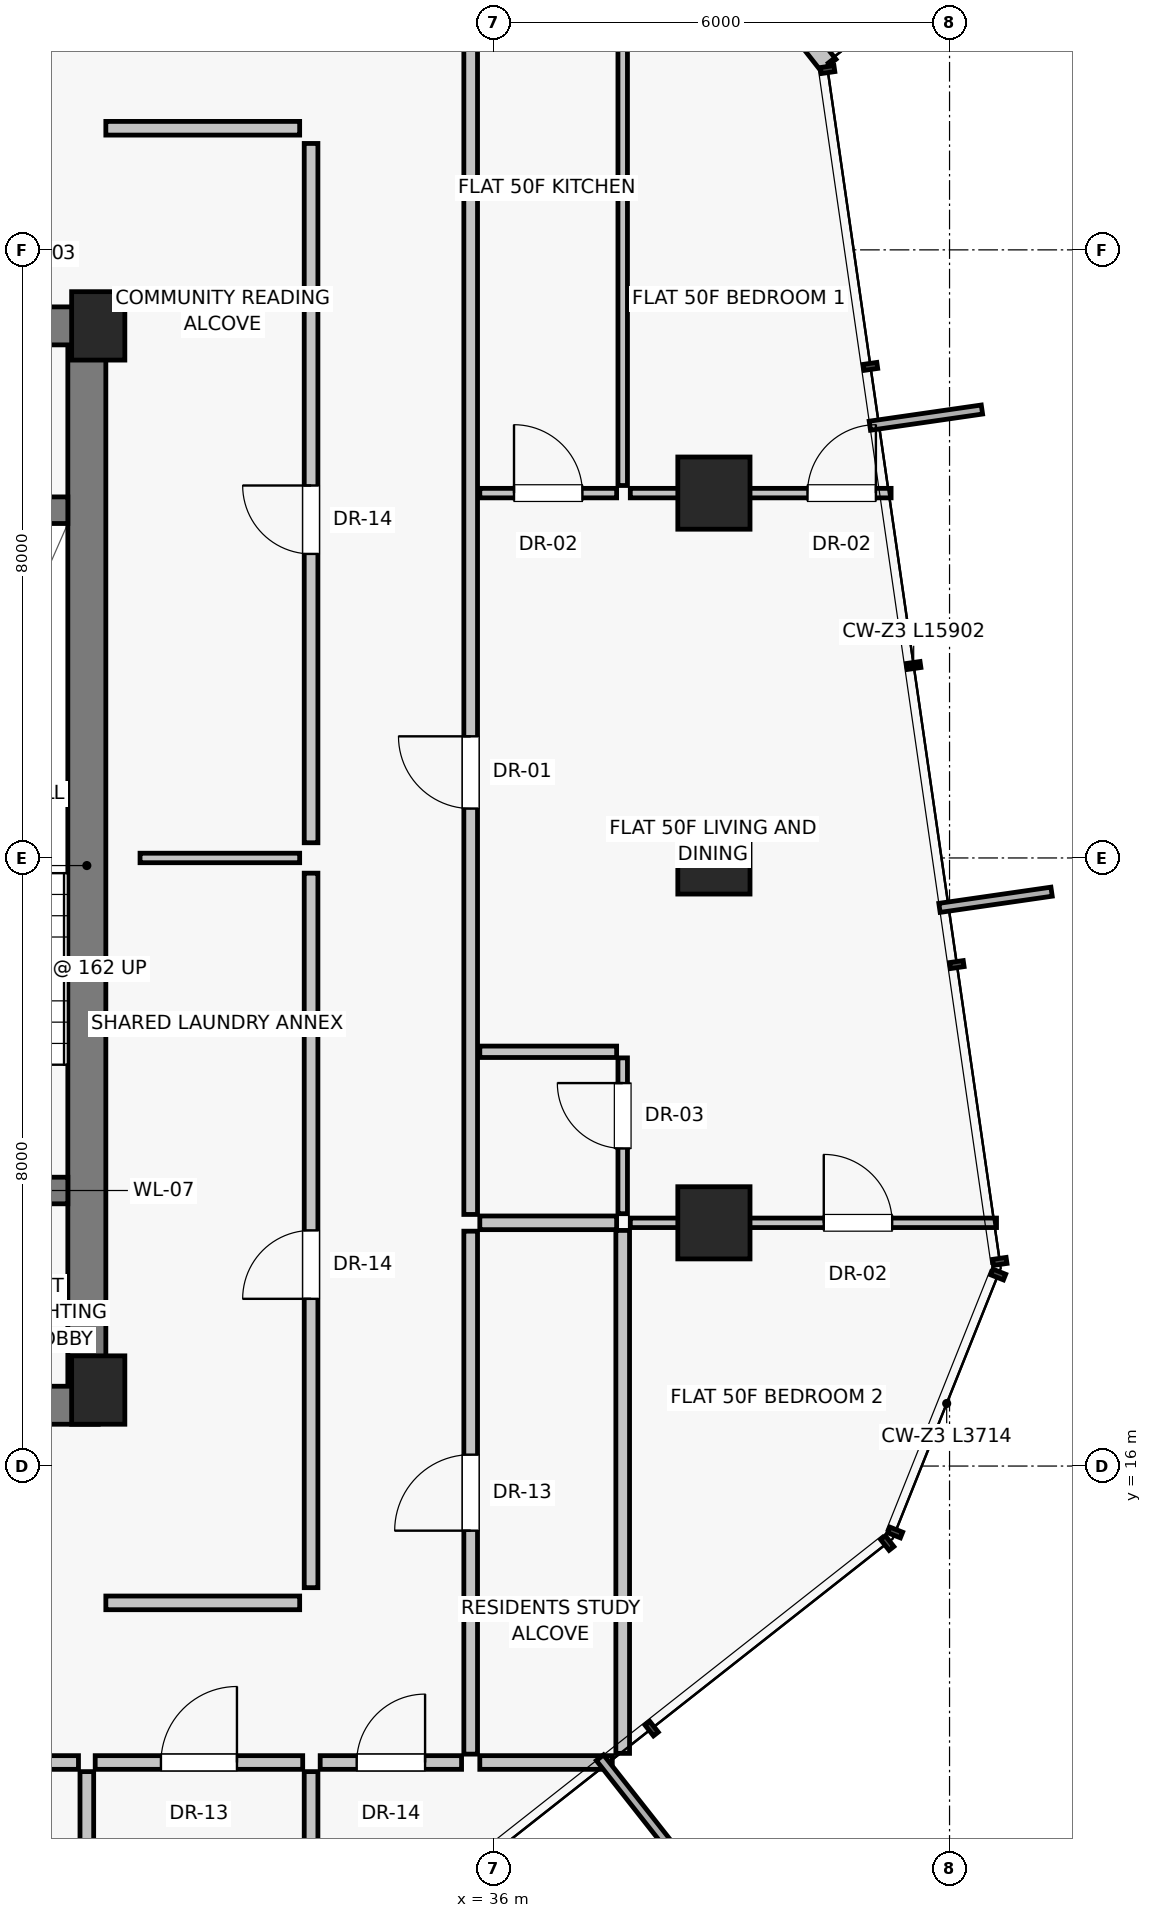
"""IFC4 building model, lengths in metres.
Left out: names, types, materials, properties, quantities, classifications, styles, units other than length and angle.
Written with IfcOpenShell. Run it as: python <this file> out.ifc"""

import sys

from ifc_helpers import new_model, si_unit, direction, frame, frame_2d, origin, origin_2d, place, context, subcontext, project, spatial, rectangle, extrude, source, transform, mapped, element, fill, save


model = new_model("IFC4")
c1 = context("Model", 3, precision=1e-05, world=origin(), true_north=direction((0.0, 1.0)))
c2 = subcontext(c1, "Body", "Model", "MODEL_VIEW")
j1 = project(units=[si_unit("LENGTHUNIT", "METRE"), si_unit("PLANEANGLEUNIT", "RADIAN")], contexts=[c1])
p1 = place(None, origin())
s1 = spatial("IfcSite", under=j1, at=p1, CompositionType="ELEMENT")
p2 = place(p1, origin())
s2 = spatial("IfcBuilding", under=s1, at=p2, CompositionType="ELEMENT")
p3 = place(p2, frame((0.0, 0.0, 178.85)))
s3 = spatial("IfcBuildingStorey", under=s2, at=p3, CompositionType="ELEMENT", Elevation=178.85)
for number, where, z_axis, x_axis in (
    (1, (30.8, 17.0, 0.0), (0.0, 0.0, 1.0), (1.0, 0.0, 0.0)),
    (2, (30.8, 31.0, 0.0), (0.0, 0.0, 1.0), (1.0, 0.0, 0.0)),
):
    element("IfcColumn", number, at=place(p3, frame(where, z_axis=z_axis, x_axis=x_axis)), inside=s3, PredefinedType="PILASTER", context=c2, shape_type="SweptSolid", body=[
        extrude(rectangle(XDim=0.7, YDim=0.9, at=origin_2d()), origin(), (0.0, 0.0, 1.0), 3.25),
    ])
for number, where, z_axis, x_axis in (
    (3, (38.9, 19.2, 0.0), (0.0, 0.0, 1.0), (1.0, 0.0, 0.0)),
    (4, (38.9, 24.0, 0.0), (0.0, 0.0, 1.0), (1.0, 0.0, 0.0)),
    (5, (38.9, 28.8, 0.0), (0.0, 0.0, 1.0), (1.0, 0.0, 0.0)),
):
    element("IfcColumn", number, at=place(p3, frame(where, z_axis=z_axis, x_axis=x_axis)), inside=s3, PredefinedType="COLUMN", context=c2, shape_type="SweptSolid", body=[
        extrude(rectangle(XDim=0.95, YDim=0.95, at=origin_2d()), origin(), (0.0, 0.0, 1.0), 3.25),
    ])
p4 = place(p3, frame((40.408, 34.43, 0.0), z_axis=(0.0, 0.0, 1.0), x_axis=(-0.618713620212, 0.78561660889, 0.0)))
e6 = element("IfcWall", 6, at=p4, inside=s3, PredefinedType="SOLIDWALL", context=c2, shape_type="SweptSolid", body=[
    extrude(rectangle(XDim=3.914, YDim=0.25, at=frame_2d((1.957, 0.0))), origin(), (0.0, 0.0, 1.0), 3.015),
])
p5 = place(p4, frame((2.26, 0.0, 0.0)))
e7 = element("IfcOpeningElement", 7, at=p5, cuts=e6, PredefinedType="OPENING", context=c2, shape_type="SweptSolid", body=[
    extrude(rectangle(XDim=1.15, YDim=2.25, at=frame_2d((0.575, 1.125))), frame((0.0, 0.135, 0.0), z_axis=(0.0, -1.0, 0.0), x_axis=(1.0, 0.0, 0.0)), (0.0, 0.0, 1.0), 0.27),
])
p6 = place(p3, frame((30.65, 16.8, 0.0), z_axis=(0.0, 0.0, 1.0), x_axis=(0.0, 1.0, 0.0)))
e8 = element("IfcWall", 8, at=p6, inside=s3, PredefinedType="SHEAR", context=c2, shape_type="SweptSolid", body=[
    extrude(rectangle(XDim=14.2, YDim=0.5, at=frame_2d((7.1, 0.0))), origin(), (0.0, 0.0, 1.0), 3.015),
])
p7 = place(p3, frame((24.95, 16.8, 0.0), z_axis=(0.0, 0.0, 1.0), x_axis=(1.0, 0.0, 0.0)))
e9 = element("IfcWall", 9, at=p7, inside=s3, PredefinedType="SHEAR", context=c2, shape_type="SweptSolid", body=[
    extrude(rectangle(XDim=5.85, YDim=0.5, at=frame_2d((2.925, 0.0))), origin(), (0.0, 0.0, 1.0), 3.015),
])
p8 = place(p7, frame((2.15, 0.0, 0.0)))
e10 = element("IfcOpeningElement", 10, at=p8, cuts=e9, PredefinedType="OPENING", context=c2, shape_type="SweptSolid", body=[
    extrude(rectangle(XDim=1.2, YDim=2.03, at=frame_2d((0.6, 1.015))), frame((0.0, 0.26, 0.0), z_axis=(0.0, -1.0, 0.0), x_axis=(1.0, 0.0, 0.0)), (0.0, 0.0, 1.0), 0.52),
])
p9 = place(p3, frame((27.0, 31.0, 0.0), z_axis=(0.0, 0.0, 1.0), x_axis=(1.0, 0.0, 0.0)))
e11 = element("IfcWall", 11, at=p9, inside=s3, PredefinedType="SHEAR", context=c2, shape_type="SweptSolid", body=[
    extrude(rectangle(XDim=3.8, YDim=0.5, at=frame_2d((1.9, 0.0))), origin(), (0.0, 0.0, 1.0), 3.015),
])
p10 = place(p9, frame((1.15, 0.0, 0.0)))
e12 = element("IfcOpeningElement", 12, at=p10, cuts=e11, PredefinedType="OPENING", context=c2, shape_type="SweptSolid", body=[
    extrude(rectangle(XDim=1.0, YDim=2.01, at=frame_2d((0.5, 1.005))), frame((0.0, 0.26, 0.0), z_axis=(0.0, -1.0, 0.0), x_axis=(1.0, 0.0, 0.0)), (0.0, 0.0, 1.0), 0.52),
])
p11 = place(p3, frame((27.025, 19.625, 0.0), z_axis=(0.0, 0.0, 1.0), x_axis=(1.0, 0.0, 0.0)))
e13 = element("IfcWall", 13, at=p11, inside=s3, PredefinedType="SHEAR", context=c2, shape_type="SweptSolid", body=[
    extrude(rectangle(XDim=3.375, YDim=0.35, at=frame_2d((1.688, 0.0))), origin(), (0.0, 0.0, 1.0), 3.015),
])
p12 = place(p11, frame((1.05, 0.0, 0.0)))
e14 = element("IfcOpeningElement", 14, at=p12, cuts=e13, PredefinedType="OPENING", context=c2, shape_type="SweptSolid", body=[
    extrude(rectangle(XDim=1.1, YDim=2.03, at=frame_2d((0.55, 1.015))), frame((0.0, 0.185, 0.0), z_axis=(0.0, -1.0, 0.0), x_axis=(1.0, 0.0, 0.0)), (0.0, 0.0, 1.0), 0.37),
])
p13 = place(p3, frame((27.025, 28.575, 0.0), z_axis=(0.0, 0.0, 1.0), x_axis=(1.0, 0.0, 0.0)))
e15 = element("IfcWall", 15, at=p13, inside=s3, PredefinedType="SHEAR", context=c2, shape_type="SweptSolid", body=[
    extrude(rectangle(XDim=3.375, YDim=0.35, at=frame_2d((1.688, 0.0))), origin(), (0.0, 0.0, 1.0), 3.015),
])
p14 = place(p3, frame((33.6, 14.4, 0.0), z_axis=(0.0, 0.0, 1.0), x_axis=(0.0, 1.0, 0.0)))
e16 = element("IfcWall", 16, at=p14, inside=s3, PredefinedType="PARTITIONING", context=c2, shape_type="SweptSolid", body=[
    extrude(rectangle(XDim=9.4, YDim=0.18, at=frame_2d((4.7, 0.0))), origin(), (0.0, 0.0, 1.0), 3.015),
])
p15 = place(p14, frame((3.8, 0.0, 0.0)))
e17 = element("IfcOpeningElement", 17, at=p15, cuts=e16, PredefinedType="OPENING", context=c2, shape_type="SweptSolid", body=[
    extrude(rectangle(XDim=0.9, YDim=2.01, at=frame_2d((0.45, 1.005))), frame((0.0, 0.1, 0.0), z_axis=(0.0, -1.0, 0.0), x_axis=(1.0, 0.0, 0.0)), (0.0, 0.0, 1.0), 0.2),
])
p16 = place(p3, frame((33.6, 24.2, 0.0), z_axis=(0.0, 0.0, 1.0), x_axis=(0.0, 1.0, 0.0)))
e18 = element("IfcWall", 18, at=p16, inside=s3, PredefinedType="PARTITIONING", context=c2, shape_type="SweptSolid", body=[
    extrude(rectangle(XDim=9.2, YDim=0.18, at=frame_2d((4.6, 0.0))), origin(), (0.0, 0.0, 1.0), 3.015),
])
p17 = place(p16, frame((3.8, 0.0, 0.0)))
e19 = element("IfcOpeningElement", 19, at=p17, cuts=e18, PredefinedType="OPENING", context=c2, shape_type="SweptSolid", body=[
    extrude(rectangle(XDim=0.9, YDim=2.01, at=frame_2d((0.45, 1.005))), frame((0.0, 0.1, 0.0), z_axis=(0.0, -1.0, 0.0), x_axis=(1.0, 0.0, 0.0)), (0.0, 0.0, 1.0), 0.2),
])
p18 = place(p3, frame((31.35, 24.0, 0.0), z_axis=(0.0, 0.0, 1.0), x_axis=(1.0, 0.0, 0.0)))
e20 = element("IfcWall", 20, at=p18, inside=s3, PredefinedType="PARTITIONING", context=c2, shape_type="SweptSolid", body=[
    extrude(rectangle(XDim=2.1, YDim=0.125, at=frame_2d((1.05, 0.0))), origin(), (0.0, 0.0, 1.0), 3.015),
])
for number, where, z_axis, x_axis in (
    (21, (30.9, 14.2, 0.0), (0.0, 0.0, 1.0), (1.0, 0.0, 0.0)),
    (22, (30.9, 33.6, 0.0), (0.0, 0.0, 1.0), (1.0, 0.0, 0.0)),
):
    element("IfcWall", number, at=place(p3, frame(where, z_axis=z_axis, x_axis=x_axis)), inside=s3, PredefinedType="PARTITIONING", context=c2, shape_type="SweptSolid", body=[
        extrude(rectangle(XDim=2.55, YDim=0.18, at=frame_2d((1.275, 0.0))), origin(), (0.0, 0.0, 1.0), 3.015),
    ])
p19 = place(p3, frame((33.6, 11.98, 0.0), z_axis=(0.0, 0.0, 1.0), x_axis=(0.0, -1.0, 0.0)))
e23 = element("IfcWall", 23, at=p19, inside=s3, PredefinedType="PARTITIONING", context=c2, shape_type="SweptSolid", body=[
    extrude(rectangle(XDim=3.001, YDim=0.18, at=frame_2d((1.5, 0.0))), origin(), (0.0, 0.0, 1.0), 3.015),
])
p20 = place(p3, frame((30.76, 12.1, 0.0), z_axis=(0.0, 0.0, 1.0), x_axis=(1.0, 0.0, 0.0)))
e24 = element("IfcWall", 24, at=p20, inside=s3, PredefinedType="PARTITIONING", context=c2, shape_type="SweptSolid", body=[
    extrude(rectangle(XDim=2.73, YDim=0.18, at=frame_2d((1.365, 0.0))), origin(), (0.0, 0.0, 1.0), 3.015),
])
p21 = place(p20, frame((0.865, 0.0, 0.0)))
e25 = element("IfcOpeningElement", 25, at=p21, cuts=e24, PredefinedType="OPENING", context=c2, shape_type="SweptSolid", body=[
    extrude(rectangle(XDim=1.0, YDim=2.01, at=frame_2d((0.5, 1.005))), frame((0.0, 0.1, 0.0), z_axis=(0.0, -1.0, 0.0), x_axis=(1.0, 0.0, 0.0)), (0.0, 0.0, 1.0), 0.2),
])
p22 = place(p3, frame((30.65, 11.98, 0.0), z_axis=(0.0, 0.0, 1.0), x_axis=(0.0, -1.0, 0.0)))
e26 = element("IfcWall", 26, at=p22, inside=s3, PredefinedType="PARTITIONING", context=c2, shape_type="SweptSolid", body=[
    extrude(rectangle(XDim=5.324, YDim=0.18, at=frame_2d((2.662, 0.0))), origin(), (0.0, 0.0, 1.0), 3.015),
])
p23 = place(p3, frame((24.854, 12.1, 0.0), z_axis=(0.0, 0.0, 1.0), x_axis=(1.0, 0.0, 0.0)))
e27 = element("IfcWall", 27, at=p23, inside=s3, PredefinedType="PARTITIONING", context=c2, shape_type="SweptSolid", body=[
    extrude(rectangle(XDim=5.686, YDim=0.18, at=frame_2d((2.843, 0.0))), origin(), (0.0, 0.0, 1.0), 3.015),
])
p24 = place(p23, frame((3.409, 0.0, 0.0)))
e28 = element("IfcOpeningElement", 28, at=p24, cuts=e27, PredefinedType="OPENING", context=c2, shape_type="SweptSolid", body=[
    extrude(rectangle(XDim=0.95, YDim=2.02, at=frame_2d((0.475, 1.01))), frame((0.0, 0.1, 0.0), z_axis=(0.0, -1.0, 0.0), x_axis=(1.0, 0.0, 0.0)), (0.0, 0.0, 1.0), 0.2),
])
p25 = place(p3, frame((35.82, 12.1, 0.0), z_axis=(0.0, 0.0, 1.0), x_axis=(1.0, 0.0, 0.0)))
e29 = element("IfcWall", 29, at=p25, inside=s3, PredefinedType="PARTITIONING", context=c2, shape_type="SweptSolid", body=[
    extrude(rectangle(XDim=1.743, YDim=0.18, at=frame_2d((0.872, 0.0))), origin(), (0.0, 0.0, 1.0), 3.015),
])
p26 = place(p3, frame((35.7, 12.21, 0.0), z_axis=(0.0, 0.0, 1.0), x_axis=(0.0, 1.0, 0.0)))
e30 = element("IfcWall", 30, at=p26, inside=s3, PredefinedType="PARTITIONING", context=c2, shape_type="SweptSolid", body=[
    extrude(rectangle(XDim=6.88, YDim=0.18, at=frame_2d((3.44, 0.0))), origin(), (0.0, 0.0, 1.0), 3.015),
])
p27 = place(p26, frame((2.94, 0.0, 0.0)))
e31 = element("IfcOpeningElement", 31, at=p27, cuts=e30, PredefinedType="OPENING", context=c2, shape_type="SweptSolid", body=[
    extrude(rectangle(XDim=1.0, YDim=2.01, at=frame_2d((0.5, 1.005))), frame((0.0, 0.1, 0.0), z_axis=(0.0, -1.0, 0.0), x_axis=(1.0, 0.0, 0.0)), (0.0, 0.0, 1.0), 0.2),
])
p28 = place(p3, frame((35.7, 19.31, 0.0), z_axis=(0.0, 0.0, 1.0), x_axis=(0.0, 1.0, 0.0)))
e32 = element("IfcWall", 32, at=p28, inside=s3, PredefinedType="PARTITIONING", context=c2, shape_type="SweptSolid", body=[
    extrude(rectangle(XDim=16.28, YDim=0.18, at=frame_2d((8.14, 0.0))), origin(), (0.0, 0.0, 1.0), 3.015),
])
p29 = place(p28, frame((5.34, 0.0, 0.0)))
e33 = element("IfcOpeningElement", 33, at=p29, cuts=e32, PredefinedType="OPENING", context=c2, shape_type="SweptSolid", body=[
    extrude(rectangle(XDim=0.95, YDim=2.02, at=frame_2d((0.475, 1.01))), frame((0.0, 0.1, 0.0), z_axis=(0.0, -1.0, 0.0), x_axis=(1.0, 0.0, 0.0)), (0.0, 0.0, 1.0), 0.2),
])
p30 = place(p3, frame((37.7, 12.22, 0.0), z_axis=(0.0, 0.0, 1.0), x_axis=(0.0, 1.0, 0.0)))
e34 = element("IfcWall", 34, at=p30, inside=s3, PredefinedType="PARTITIONING", context=c2, shape_type="SweptSolid", body=[
    extrude(rectangle(XDim=6.88, YDim=0.18, at=frame_2d((3.44, 0.0))), origin(), (0.0, 0.0, 1.0), 3.015),
])
p31 = place(p3, frame((35.82, 19.2, 0.0), z_axis=(0.0, 0.0, 1.0), x_axis=(1.0, 0.0, 0.0)))
e35 = element("IfcWall", 35, at=p31, inside=s3, PredefinedType="PARTITIONING", context=c2, shape_type="SweptSolid", body=[
    extrude(rectangle(XDim=1.8, YDim=0.18, at=frame_2d((0.9, 0.0))), origin(), (0.0, 0.0, 1.0), 2.469),
])
p32 = place(p3, frame((37.8, 19.2, 0.0), z_axis=(0.0, 0.0, 1.0), x_axis=(1.0, 0.0, 0.0)))
e36 = element("IfcWall", 36, at=p32, inside=s3, PredefinedType="PARTITIONING", context=c2, shape_type="SweptSolid", body=[
    extrude(rectangle(XDim=4.818, YDim=0.125, at=frame_2d((2.409, 0.0))), origin(), (0.0, 0.0, 1.0), 2.469),
])
p33 = place(p32, frame((2.545, 0.0, 0.0)))
e37 = element("IfcOpeningElement", 37, at=p33, cuts=e36, PredefinedType="OPENING", context=c2, shape_type="SweptSolid", body=[
    extrude(rectangle(XDim=0.9, YDim=2.01, at=frame_2d((0.45, 1.005))), frame((0.0, 0.073, 0.0), z_axis=(0.0, -1.0, 0.0), x_axis=(1.0, 0.0, 0.0)), (0.0, 0.0, 1.0), 0.145),
])
p34 = place(p3, frame((35.82, 21.45, 0.0), z_axis=(0.0, 0.0, 1.0), x_axis=(1.0, 0.0, 0.0)))
e38 = element("IfcWall", 38, at=p34, inside=s3, PredefinedType="PARTITIONING", context=c2, shape_type="SweptSolid", body=[
    extrude(rectangle(XDim=1.8, YDim=0.15, at=frame_2d((0.9, 0.0))), origin(), (0.0, 0.0, 1.0), 3.015),
])
p35 = place(p3, frame((37.7, 19.32, 0.0), z_axis=(0.0, 0.0, 1.0), x_axis=(0.0, 1.0, 0.0)))
e39 = element("IfcWall", 39, at=p35, inside=s3, PredefinedType="PARTITIONING", context=c2, shape_type="SweptSolid", body=[
    extrude(rectangle(XDim=2.05, YDim=0.125, at=frame_2d((1.025, 0.0))), origin(), (0.0, 0.0, 1.0), 3.015),
])
p36 = place(p35, frame((0.858, 0.0, 0.0)))
e40 = element("IfcOpeningElement", 40, at=p36, cuts=e39, PredefinedType="OPENING", context=c2, shape_type="SweptSolid", body=[
    extrude(rectangle(XDim=0.86, YDim=2.01, at=frame_2d((0.43, 1.005))), frame((0.0, 0.073, 0.0), z_axis=(0.0, -1.0, 0.0), x_axis=(1.0, 0.0, 0.0)), (0.0, 0.0, 1.0), 0.145),
])
p37 = place(p3, frame((35.82, 28.8, 0.0), z_axis=(0.0, 0.0, 1.0), x_axis=(1.0, 0.0, 0.0)))
e41 = element("IfcWall", 41, at=p37, inside=s3, PredefinedType="PARTITIONING", context=c2, shape_type="SweptSolid", body=[
    extrude(rectangle(XDim=1.8, YDim=0.125, at=frame_2d((0.9, 0.0))), origin(), (0.0, 0.0, 1.0), 2.469),
])
p38 = place(p37, frame((0.45, 0.0, 0.0)))
e42 = element("IfcOpeningElement", 42, at=p38, cuts=e41, PredefinedType="OPENING", context=c2, shape_type="SweptSolid", body=[
    extrude(rectangle(XDim=0.9, YDim=2.01, at=frame_2d((0.45, 1.005))), frame((0.0, 0.073, 0.0), z_axis=(0.0, -1.0, 0.0), x_axis=(1.0, 0.0, 0.0)), (0.0, 0.0, 1.0), 0.145),
])
p39 = place(p3, frame((37.7, 28.9, 0.0), z_axis=(0.0, 0.0, 1.0), x_axis=(0.0, 1.0, 0.0)))
e43 = element("IfcWall", 43, at=p39, inside=s3, PredefinedType="PARTITIONING", context=c2, shape_type="SweptSolid", body=[
    extrude(rectangle(XDim=6.68, YDim=0.125, at=frame_2d((3.34, 0.0))), origin(), (0.0, 0.0, 1.0), 3.015),
])
p40 = place(p3, frame((37.8, 28.8, 0.0), z_axis=(0.0, 0.0, 1.0), x_axis=(1.0, 0.0, 0.0)))
e44 = element("IfcWall", 44, at=p40, inside=s3, PredefinedType="PARTITIONING", context=c2, shape_type="SweptSolid", body=[
    extrude(rectangle(XDim=3.431, YDim=0.125, at=frame_2d((1.715, 0.0))), origin(), (0.0, 0.0, 1.0), 2.469),
])
p41 = place(p40, frame((2.331, 0.0, 0.0)))
e45 = element("IfcOpeningElement", 45, at=p41, cuts=e44, PredefinedType="OPENING", context=c2, shape_type="SweptSolid", body=[
    extrude(rectangle(XDim=0.9, YDim=2.01, at=frame_2d((0.45, 1.005))), frame((0.0, 0.073, 0.0), z_axis=(0.0, -1.0, 0.0), x_axis=(1.0, 0.0, 0.0)), (0.0, 0.0, 1.0), 0.145),
])
p42 = place(p3, frame((33.72, 12.1, 0.0), z_axis=(0.0, 0.0, 1.0), x_axis=(1.0, 0.0, 0.0)))
e46 = element("IfcWall", 46, at=p42, inside=s3, PredefinedType="PARTITIONING", context=c2, shape_type="SweptSolid", body=[
    extrude(rectangle(XDim=1.86, YDim=0.18, at=frame_2d((0.93, 0.0))), origin(), (0.0, 0.0, 1.0), 3.015),
])
p43 = place(p42, frame((0.48, 0.0, 0.0)))
e47 = element("IfcOpeningElement", 47, at=p43, cuts=e46, PredefinedType="OPENING", context=c2, shape_type="SweptSolid", body=[
    extrude(rectangle(XDim=0.9, YDim=2.01, at=frame_2d((0.45, 1.005))), frame((0.0, 0.1, 0.0), z_axis=(0.0, -1.0, 0.0), x_axis=(1.0, 0.0, 0.0)), (0.0, 0.0, 1.0), 0.2),
])
m1 = source(origin(), c2, "Body", "SweptSolid", [
    extrude(rectangle(XDim=0.9, YDim=2.01, at=frame_2d((0.45, 1.005))), frame((0.0, 0.025, 0.0), z_axis=(0.0, -1.0, 0.0), x_axis=(1.0, 0.0, 0.0)), (0.0, 0.0, 1.0), 0.05),
])
p44 = place(p15, origin())
e48 = element("IfcDoor", 48, at=p44, inside=s3, OperationType="SINGLE_SWING_LEFT", PredefinedType="DOOR", context=c2, shape_type="MappedRepresentation", body=[
    mapped(m1, transform((0.0, 0.0, 0.0), scale=1.0)),
])
fill(e17, e48)
p45 = place(p17, origin())
e49 = element("IfcDoor", 49, at=p45, inside=s3, OperationType="SINGLE_SWING_RIGHT", PredefinedType="DOOR", context=c2, shape_type="MappedRepresentation", body=[
    mapped(m1, transform((0.0, 0.0, 0.0), scale=1.0)),
])
fill(e19, e49)
m2 = source(origin(), c2, "Body", "SweptSolid", [
    extrude(rectangle(XDim=1.0, YDim=2.01, at=frame_2d((0.5, 1.005))), frame((0.0, 0.025, 0.0), z_axis=(0.0, -1.0, 0.0), x_axis=(1.0, 0.0, 0.0)), (0.0, 0.0, 1.0), 0.05),
])
p46 = place(p21, origin())
e50 = element("IfcDoor", 50, at=p46, inside=s3, OperationType="SINGLE_SWING_RIGHT", PredefinedType="DOOR", context=c2, shape_type="MappedRepresentation", body=[
    mapped(m2, transform((0.0, 0.0, 0.0), scale=1.0)),
])
fill(e25, e50)
p47 = place(p27, origin())
e51 = element("IfcDoor", 51, at=p47, inside=s3, OperationType="SINGLE_SWING_LEFT", PredefinedType="DOOR", context=c2, shape_type="MappedRepresentation", body=[
    mapped(m2, transform((0.0, 0.0, 0.0), scale=1.0)),
])
fill(e31, e51)
m3 = source(origin(), c2, "Body", "SweptSolid", [
    extrude(rectangle(XDim=0.95, YDim=2.02, at=frame_2d((0.475, 1.01))), frame((0.0, 0.025, 0.0), z_axis=(0.0, -1.0, 0.0), x_axis=(1.0, 0.0, 0.0)), (0.0, 0.0, 1.0), 0.05),
])
p48 = place(p29, origin())
e52 = element("IfcDoor", 52, at=p48, inside=s3, OperationType="SINGLE_SWING_RIGHT", PredefinedType="DOOR", context=c2, shape_type="MappedRepresentation", body=[
    mapped(m3, transform((0.0, 0.0, 0.0), scale=1.0)),
])
fill(e33, e52)
p49 = place(p33, origin())
e53 = element("IfcDoor", 53, at=p49, inside=s3, OperationType="SINGLE_SWING_LEFT", PredefinedType="DOOR", context=c2, shape_type="MappedRepresentation", body=[
    mapped(m1, transform((0.0, 0.0, 0.0), scale=1.0)),
])
fill(e37, e53)
m4 = source(origin(), c2, "Body", "SweptSolid", [
    extrude(rectangle(XDim=0.86, YDim=2.01, at=frame_2d((0.43, 1.005))), frame((0.0, 0.025, 0.0), z_axis=(0.0, -1.0, 0.0), x_axis=(1.0, 0.0, 0.0)), (0.0, 0.0, 1.0), 0.05),
])
p50 = place(p36, origin())
e54 = element("IfcDoor", 54, at=p50, inside=s3, OperationType="SINGLE_SWING_RIGHT", PredefinedType="DOOR", context=c2, shape_type="MappedRepresentation", body=[
    mapped(m4, transform((0.0, 0.0, 0.0), scale=1.0)),
])
fill(e40, e54)
p51 = place(p38, origin())
e55 = element("IfcDoor", 55, at=p51, inside=s3, OperationType="SINGLE_SWING_LEFT", PredefinedType="DOOR", context=c2, shape_type="MappedRepresentation", body=[
    mapped(m1, transform((0.0, 0.0, 0.0), scale=1.0)),
])
fill(e42, e55)
p52 = place(p41, origin())
e56 = element("IfcDoor", 56, at=p52, inside=s3, OperationType="SINGLE_SWING_RIGHT", PredefinedType="DOOR", context=c2, shape_type="MappedRepresentation", body=[
    mapped(m1, transform((0.0, 0.0, 0.0), scale=1.0)),
])
fill(e45, e56)
p53 = place(p43, origin())
e57 = element("IfcDoor", 57, at=p53, inside=s3, OperationType="SINGLE_SWING_RIGHT", PredefinedType="DOOR", context=c2, shape_type="MappedRepresentation", body=[
    mapped(m1, transform((0.0, 0.0, 0.0), scale=1.0)),
])
fill(e47, e57)
save(model, sys.argv[1])
